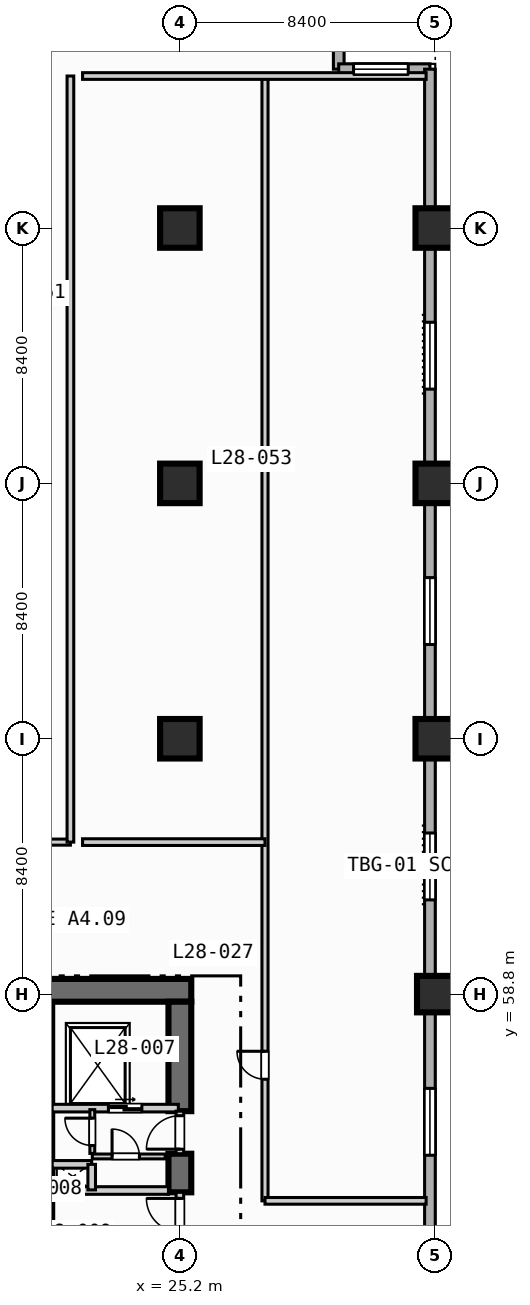
"""IFC4 building model, lengths in metres.
Left out: names, types, materials, properties, quantities, classifications, styles, units other than length and angle.
Written with IfcOpenShell. Run it as: python <this file> out.ifc"""

import sys

from ifc_helpers import new_model, si_unit, direction, frame, frame_2d, origin, origin_2d, place, context, subcontext, project, spatial, rectangle, extrude, element, fill, save


model = new_model("IFC4")
c1 = context("Model", 3, precision=1e-05, world=origin(), true_north=direction((0.0, 1.0)))
c2 = subcontext(c1, "Body", "Model", "MODEL_VIEW")
j1 = project(units=[si_unit("LENGTHUNIT", "METRE"), si_unit("PLANEANGLEUNIT", "RADIAN")], contexts=[c1])
p1 = place(None, origin())
s1 = spatial("IfcSite", under=j1, at=p1, CompositionType="ELEMENT")
p2 = place(p1, origin())
s2 = spatial("IfcBuilding", under=s1, at=p2, CompositionType="ELEMENT")
p3 = place(p2, frame((0.0, 0.0, 119.0)))
s3 = spatial("IfcBuildingStorey", under=s2, at=p3, CompositionType="ELEMENT", Elevation=119.0)
p4 = place(p3, frame((20.5, 58.925, 0.0), z_axis=(0.0, 0.0, 1.0), x_axis=(1.0, 0.0, 0.0)))
e1 = element("IfcWall", 1, at=p4, inside=s3, PredefinedType="SHEAR", context=c2, shape_type="SweptSolid", body=[
    extrude(rectangle(XDim=5.075, YDim=0.75, at=frame_2d((2.538, 0.0))), origin(), (0.0, 0.0, 1.0), 3.55),
])
p5 = place(p3, frame((25.2, 52.28, 0.0), z_axis=(0.0, 0.0, 1.0), x_axis=(0.0, 1.0, 0.0)))
e2 = element("IfcWall", 2, at=p5, inside=s3, PredefinedType="SHEAR", context=c2, shape_type="SweptSolid", body=[
    extrude(rectangle(XDim=1.27, YDim=0.75, at=frame_2d((0.635, 0.0))), origin(), (0.0, 0.0, 1.0), 3.55),
])
p6 = place(p3, frame((25.2, 54.95, 0.0), z_axis=(0.0, 0.0, 1.0), x_axis=(0.0, 1.0, 0.0)))
e3 = element("IfcWall", 3, at=p6, inside=s3, PredefinedType="SHEAR", context=c2, shape_type="SweptSolid", body=[
    extrude(rectangle(XDim=3.6, YDim=0.75, at=frame_2d((1.8, 0.0))), origin(), (0.0, 0.0, 1.0), 3.55),
])
for number, where, z_axis, x_axis in (
    (4, (25.2, 67.2, 0.0), (0.0, 0.0, 1.0), (1.0, 0.0, 0.0)),
    (5, (25.2, 75.6, 0.0), (0.0, 0.0, 1.0), (1.0, 0.0, 0.0)),
    (6, (25.2, 84.0, 0.0), (0.0, 0.0, 1.0), (1.0, 0.0, 0.0)),
):
    element("IfcColumn", number, at=place(p3, frame(where, z_axis=z_axis, x_axis=x_axis)), inside=s3, PredefinedType="COLUMN", context=c2, shape_type="SweptSolid", body=[
        extrude(rectangle(XDim=1.3, YDim=1.3, at=origin_2d()), origin(), (0.0, 0.0, 1.0), 3.8),
    ])
p7 = place(p3, frame((33.6, 58.8, 0.0), z_axis=(0.0, 0.0, 1.0), x_axis=(1.0, 0.0, 0.0)))
e7 = element("IfcColumn", 7, at=p7, inside=s3, PredefinedType="COLUMN", context=c2, shape_type="SweptSolid", body=[
    extrude(rectangle(XDim=1.2, YDim=1.2, at=origin_2d()), origin(), (0.0, 0.0, 1.0), 3.8),
])
for number, where, z_axis, x_axis in (
    (8, (33.6, 67.2, 0.0), (0.0, 0.0, 1.0), (1.0, 0.0, 0.0)),
    (9, (33.6, 75.6, 0.0), (0.0, 0.0, 1.0), (1.0, 0.0, 0.0)),
    (10, (33.6, 84.0, 0.0), (0.0, 0.0, 1.0), (1.0, 0.0, 0.0)),
):
    element("IfcColumn", number, at=place(p3, frame(where, z_axis=z_axis, x_axis=x_axis)), inside=s3, PredefinedType="COLUMN", context=c2, shape_type="SweptSolid", body=[
        extrude(rectangle(XDim=1.3, YDim=1.3, at=origin_2d()), origin(), (0.0, 0.0, 1.0), 3.8),
    ])
p8 = place(p3, frame((30.425, 92.225, 0.0), z_axis=(0.0, 0.0, 1.0), x_axis=(0.0, -1.0, 0.0)))
e11 = element("IfcWall", 11, at=p8, inside=s3, PredefinedType="STANDARD", context=c2, shape_type="SweptSolid", body=[
    extrude(rectangle(XDim=3.0, YDim=0.35, at=frame_2d((1.5, 0.0))), origin(), (0.0, 0.0, 1.0), 3.55),
])
p9 = place(p3, frame((30.425, 89.225, 0.0), z_axis=(0.0, 0.0, 1.0), x_axis=(1.0, 0.0, 0.0)))
e12 = element("IfcWall", 12, at=p9, inside=s3, PredefinedType="STANDARD", context=c2, shape_type="SweptSolid", body=[
    extrude(rectangle(XDim=3.0, YDim=0.35, at=frame_2d((1.5, 0.0))), origin(), (0.0, 0.0, 1.0), 3.55),
])
p10 = place(p9, frame((0.488, 0.0, 0.85)))
e13 = element("IfcOpeningElement", 13, at=p10, cuts=e12, PredefinedType="OPENING", context=c2, shape_type="SweptSolid", body=[
    extrude(rectangle(XDim=1.8, YDim=1.8, at=frame_2d((0.9, 0.9))), frame((0.0, 0.185, 0.0), z_axis=(0.0, -1.0, 0.0), x_axis=(1.0, 0.0, 0.0)), (0.0, 0.0, 1.0), 0.37),
])
p11 = place(p3, frame((33.425, 89.225, 0.0), z_axis=(0.0, 0.0, 1.0), x_axis=(0.0, -1.0, 0.0)))
e14 = element("IfcWall", 14, at=p11, inside=s3, PredefinedType="STANDARD", context=c2, shape_type="SweptSolid", body=[
    extrude(rectangle(XDim=55.8, YDim=0.35, at=frame_2d((27.9, 0.0))), origin(), (0.0, 0.0, 1.0), 3.55),
])
p12 = place(p11, frame((50.325, 0.0, 0.85)))
e15 = element("IfcOpeningElement", 15, at=p12, cuts=e14, PredefinedType="OPENING", context=c2, shape_type="SweptSolid", body=[
    extrude(rectangle(XDim=2.2, YDim=1.8, at=frame_2d((1.1, 0.9))), frame((0.0, 0.185, 0.0), z_axis=(0.0, -1.0, 0.0), x_axis=(1.0, 0.0, 0.0)), (0.0, 0.0, 1.0), 0.37),
])
p13 = place(p11, frame((33.525, 0.0, 0.85)))
e16 = element("IfcOpeningElement", 16, at=p13, cuts=e14, PredefinedType="OPENING", context=c2, shape_type="SweptSolid", body=[
    extrude(rectangle(XDim=2.2, YDim=1.8, at=frame_2d((1.1, 0.9))), frame((0.0, 0.185, 0.0), z_axis=(0.0, -1.0, 0.0), x_axis=(1.0, 0.0, 0.0)), (0.0, 0.0, 1.0), 0.37),
])
p14 = place(p11, frame((25.125, 0.0, 0.85)))
e17 = element("IfcOpeningElement", 17, at=p14, cuts=e14, PredefinedType="OPENING", context=c2, shape_type="SweptSolid", body=[
    extrude(rectangle(XDim=2.2, YDim=1.8, at=frame_2d((1.1, 0.9))), frame((0.0, 0.185, 0.0), z_axis=(0.0, -1.0, 0.0), x_axis=(1.0, 0.0, 0.0)), (0.0, 0.0, 1.0), 0.37),
])
p15 = place(p11, frame((16.725, 0.0, 0.85)))
e18 = element("IfcOpeningElement", 18, at=p15, cuts=e14, PredefinedType="OPENING", context=c2, shape_type="SweptSolid", body=[
    extrude(rectangle(XDim=2.2, YDim=1.8, at=frame_2d((1.1, 0.9))), frame((0.0, 0.185, 0.0), z_axis=(0.0, -1.0, 0.0), x_axis=(1.0, 0.0, 0.0)), (0.0, 0.0, 1.0), 0.37),
])
p16 = place(p11, frame((8.325, 0.0, 0.85)))
e19 = element("IfcOpeningElement", 19, at=p16, cuts=e14, PredefinedType="OPENING", context=c2, shape_type="SweptSolid", body=[
    extrude(rectangle(XDim=2.2, YDim=1.8, at=frame_2d((1.1, 0.9))), frame((0.0, 0.185, 0.0), z_axis=(0.0, -1.0, 0.0), x_axis=(1.0, 0.0, 0.0)), (0.0, 0.0, 1.0), 0.37),
])
p17 = place(p3, frame((25.2, 50.8, 0.0), z_axis=(0.0, 0.0, 1.0), x_axis=(0.0, 1.0, 0.0)))
e20 = element("IfcWall", 20, at=p17, inside=s3, PredefinedType="SOLIDWALL", context=c2, shape_type="SweptSolid", body=[
    extrude(rectangle(XDim=1.48, YDim=0.25, at=frame_2d((0.74, 0.0))), origin(), (0.0, 0.0, 1.0), 3.55),
])
p18 = place(p17, frame((0.18, 0.0, 0.0)))
e21 = element("IfcOpeningElement", 21, at=p18, cuts=e20, PredefinedType="OPENING", context=c2, shape_type="SweptSolid", body=[
    extrude(rectangle(XDim=1.1, YDim=2.15, at=frame_2d((0.55, 1.075))), frame((0.0, 0.135, 0.0), z_axis=(0.0, -1.0, 0.0), x_axis=(1.0, 0.0, 0.0)), (0.0, 0.0, 1.0), 0.27),
])
p19 = place(p3, frame((21.0, 52.34, 0.0), z_axis=(0.0, 0.0, 1.0), x_axis=(1.0, 0.0, 0.0)))
e22 = element("IfcWall", 22, at=p19, inside=s3, PredefinedType="SOLIDWALL", context=c2, shape_type="SweptSolid", body=[
    extrude(rectangle(XDim=3.825, YDim=0.25, at=frame_2d((1.913, 0.0))), origin(), (0.0, 0.0, 1.0), 3.55),
])
p20 = place(p3, frame((21.0, 55.05, 0.0), z_axis=(0.0, 0.0, 1.0), x_axis=(1.0, 0.0, 0.0)))
e23 = element("IfcWall", 23, at=p20, inside=s3, PredefinedType="SOLIDWALL", context=c2, shape_type="SweptSolid", body=[
    extrude(rectangle(XDim=4.15, YDim=0.25, at=frame_2d((2.075, 0.0))), origin(), (0.0, 0.0, 1.0), 3.55),
])
p21 = place(p20, frame((1.85, 0.0, 0.0)))
e24 = element("IfcOpeningElement", 24, at=p21, cuts=e23, PredefinedType="OPENING", context=c2, shape_type="SweptSolid", body=[
    extrude(rectangle(XDim=1.1, YDim=2.15, at=frame_2d((0.55, 1.075))), frame((0.0, 0.135, 0.0), z_axis=(0.0, -1.0, 0.0), x_axis=(1.0, 0.0, 0.0)), (0.0, 0.0, 1.0), 0.27),
])
p22 = place(p3, frame((25.2, 53.55, 0.0), z_axis=(0.0, 0.0, 1.0), x_axis=(0.0, 1.0, 0.0)))
e25 = element("IfcWall", 25, at=p22, inside=s3, PredefinedType="SOLIDWALL", context=c2, shape_type="SweptSolid", body=[
    extrude(rectangle(XDim=1.4, YDim=0.25, at=frame_2d((0.7, 0.0))), origin(), (0.0, 0.0, 1.0), 3.55),
])
p23 = place(p22, frame((0.15, 0.0, 0.0)))
e26 = element("IfcOpeningElement", 26, at=p23, cuts=e25, PredefinedType="OPENING", context=c2, shape_type="SweptSolid", body=[
    extrude(rectangle(XDim=1.1, YDim=2.15, at=frame_2d((0.55, 1.075))), frame((0.0, 0.135, 0.0), z_axis=(0.0, -1.0, 0.0), x_axis=(1.0, 0.0, 0.0)), (0.0, 0.0, 1.0), 0.27),
])
p24 = place(p3, frame((21.0, 53.2, 0.0), z_axis=(0.0, 0.0, 1.0), x_axis=(1.0, 0.0, 0.0)))
e27 = element("IfcWall", 27, at=p24, inside=s3, PredefinedType="SOLIDWALL", context=c2, shape_type="SweptSolid", body=[
    extrude(rectangle(XDim=1.3, YDim=0.25, at=frame_2d((0.65, 0.0))), origin(), (0.0, 0.0, 1.0), 3.55),
])
p25 = place(p3, frame((22.3, 52.36, 0.0), z_axis=(0.0, 0.0, 1.0), x_axis=(0.0, 1.0, 0.0)))
e28 = element("IfcWall", 28, at=p25, inside=s3, PredefinedType="SOLIDWALL", context=c2, shape_type="SweptSolid", body=[
    extrude(rectangle(XDim=0.84, YDim=0.25, at=frame_2d((0.42, 0.0))), origin(), (0.0, 0.0, 1.0), 3.55),
])
p26 = place(p3, frame((22.32, 53.56, 0.0), z_axis=(0.0, 0.0, 1.0), x_axis=(0.0, 1.0, 0.0)))
e29 = element("IfcWall", 29, at=p26, inside=s3, PredefinedType="PARTITIONING", context=c2, shape_type="SweptSolid", body=[
    extrude(rectangle(XDim=1.44, YDim=0.16, at=frame_2d((0.72, 0.0))), origin(), (0.0, 0.0, 1.0), 3.55),
])
p27 = place(p26, frame((0.26, 0.0, 0.0)))
e30 = element("IfcOpeningElement", 30, at=p27, cuts=e29, PredefinedType="OPENING", context=c2, shape_type="SweptSolid", body=[
    extrude(rectangle(XDim=0.9, YDim=2.1, at=frame_2d((0.45, 1.05))), frame((0.0, 0.09, 0.0), z_axis=(0.0, -1.0, 0.0), x_axis=(1.0, 0.0, 0.0)), (0.0, 0.0, 1.0), 0.18),
])
p28 = place(p3, frame((22.32, 53.46, 0.0), z_axis=(0.0, 0.0, 1.0), x_axis=(1.0, 0.0, 0.0)))
e31 = element("IfcWall", 31, at=p28, inside=s3, PredefinedType="PARTITIONING", context=c2, shape_type="SweptSolid", body=[
    extrude(rectangle(XDim=2.4, YDim=0.16, at=frame_2d((1.2, 0.0))), origin(), (0.0, 0.0, 1.0), 3.55),
])
p29 = place(p28, frame((0.65, 0.0, 0.0)))
e32 = element("IfcOpeningElement", 32, at=p29, cuts=e31, PredefinedType="OPENING", context=c2, shape_type="SweptSolid", body=[
    extrude(rectangle(XDim=0.9, YDim=2.1, at=frame_2d((0.45, 1.05))), frame((0.0, 0.09, 0.0), z_axis=(0.0, -1.0, 0.0), x_axis=(1.0, 0.0, 0.0)), (0.0, 0.0, 1.0), 0.18),
])
p30 = place(p3, frame((3.4, 63.8, 0.0), z_axis=(0.0, 0.0, 1.0), x_axis=(1.0, 0.0, 0.0)))
e33 = element("IfcWall", 33, at=p30, inside=s3, PredefinedType="PARTITIONING", context=c2, shape_type="SweptSolid", body=[
    extrude(rectangle(XDim=18.2, YDim=0.2, at=frame_2d((9.1, 0.0))), origin(), (0.0, 0.0, 1.0), 3.55),
])
p31 = place(p30, frame((4.05, 0.0, 0.0)))
e34 = element("IfcOpeningElement", 34, at=p31, cuts=e33, PredefinedType="OPENING", context=c2, shape_type="SweptSolid", body=[
    extrude(rectangle(XDim=1.0, YDim=2.15, at=frame_2d((0.5, 1.075))), frame((0.0, 0.11, 0.0), z_axis=(0.0, -1.0, 0.0), x_axis=(1.0, 0.0, 0.0)), (0.0, 0.0, 1.0), 0.22),
])
p32 = place(p3, frame((21.6, 63.8, 0.0), z_axis=(0.0, 0.0, 1.0), x_axis=(0.0, 1.0, 0.0)))
e35 = element("IfcWall", 35, at=p32, inside=s3, PredefinedType="PARTITIONING", context=c2, shape_type="SweptSolid", body=[
    extrude(rectangle(XDim=25.2, YDim=0.22, at=frame_2d((12.6, 0.0))), origin(), (0.0, 0.0, 1.0), 3.55),
])
p33 = place(p3, frame((28.0, 52.0, 0.0), z_axis=(0.0, 0.0, 1.0), x_axis=(0.0, 1.0, 0.0)))
e36 = element("IfcWall", 36, at=p33, inside=s3, PredefinedType="PARTITIONING", context=c2, shape_type="SweptSolid", body=[
    extrude(rectangle(XDim=37.0, YDim=0.2, at=frame_2d((18.5, 0.0))), origin(), (0.0, 0.0, 1.0), 3.55),
])
p34 = place(p33, frame((4.0, 0.0, 0.0)))
e37 = element("IfcOpeningElement", 37, at=p34, cuts=e36, PredefinedType="OPENING", context=c2, shape_type="SweptSolid", body=[
    extrude(rectangle(XDim=0.92, YDim=2.1, at=frame_2d((0.46, 1.05))), frame((0.0, 0.11, 0.0), z_axis=(0.0, -1.0, 0.0), x_axis=(1.0, 0.0, 0.0)), (0.0, 0.0, 1.0), 0.22),
])
p35 = place(p3, frame((28.0, 52.0, 0.0), z_axis=(0.0, 0.0, 1.0), x_axis=(1.0, 0.0, 0.0)))
e38 = element("IfcWall", 38, at=p35, inside=s3, PredefinedType="PARTITIONING", context=c2, shape_type="SweptSolid", body=[
    extrude(rectangle(XDim=5.3, YDim=0.22, at=frame_2d((2.65, 0.0))), origin(), (0.0, 0.0, 1.0), 3.55),
])
p36 = place(p3, frame((22.0, 89.0, 0.0), z_axis=(0.0, 0.0, 1.0), x_axis=(1.0, 0.0, 0.0)))
e39 = element("IfcWall", 39, at=p36, inside=s3, PredefinedType="PARTITIONING", context=c2, shape_type="SweptSolid", body=[
    extrude(rectangle(XDim=11.3, YDim=0.22, at=frame_2d((5.65, 0.0))), origin(), (0.0, 0.0, 1.0), 3.55),
])
p37 = place(p3, frame((22.0, 63.8, 0.0), z_axis=(0.0, 0.0, 1.0), x_axis=(1.0, 0.0, 0.0)))
e40 = element("IfcWall", 40, at=p37, inside=s3, PredefinedType="PARTITIONING", context=c2, shape_type="SweptSolid", body=[
    extrude(rectangle(XDim=6.0, YDim=0.22, at=frame_2d((3.0, 0.0))), origin(), (0.0, 0.0, 1.0), 3.55),
])
p38 = place(p10, origin())
e41 = element("IfcWindow", 41, at=p38, inside=s3, PartitioningType="SINGLE_PANEL", PredefinedType="WINDOW", context=c2, shape_type="SweptSolid", body=[
    extrude(rectangle(XDim=1.8, YDim=1.8, at=frame_2d((0.9, 0.9))), frame((0.0, 0.03, 0.0), z_axis=(0.0, -1.0, 0.0), x_axis=(1.0, 0.0, 0.0)), (0.0, 0.0, 1.0), 0.06),
])
fill(e13, e41)
p39 = place(p13, origin())
e42 = element("IfcWindow", 42, at=p39, inside=s3, PartitioningType="SINGLE_PANEL", PredefinedType="WINDOW", context=c2, shape_type="SweptSolid", body=[
    extrude(rectangle(XDim=2.2, YDim=1.8, at=frame_2d((1.1, 0.9))), frame((0.0, 0.03, 0.0), z_axis=(0.0, -1.0, 0.0), x_axis=(1.0, 0.0, 0.0)), (0.0, 0.0, 1.0), 0.06),
])
fill(e16, e42)
p40 = place(p14, origin())
e43 = element("IfcWindow", 43, at=p40, inside=s3, PartitioningType="SINGLE_PANEL", PredefinedType="WINDOW", context=c2, shape_type="SweptSolid", body=[
    extrude(rectangle(XDim=2.2, YDim=1.8, at=frame_2d((1.1, 0.9))), frame((0.0, 0.03, 0.0), z_axis=(0.0, -1.0, 0.0), x_axis=(1.0, 0.0, 0.0)), (0.0, 0.0, 1.0), 0.06),
])
fill(e17, e43)
p41 = place(p15, origin())
e44 = element("IfcWindow", 44, at=p41, inside=s3, PartitioningType="SINGLE_PANEL", PredefinedType="WINDOW", context=c2, shape_type="SweptSolid", body=[
    extrude(rectangle(XDim=2.2, YDim=1.8, at=frame_2d((1.1, 0.9))), frame((0.0, 0.03, 0.0), z_axis=(0.0, -1.0, 0.0), x_axis=(1.0, 0.0, 0.0)), (0.0, 0.0, 1.0), 0.06),
])
fill(e18, e44)
p42 = place(p16, origin())
e45 = element("IfcWindow", 45, at=p42, inside=s3, PartitioningType="SINGLE_PANEL", PredefinedType="WINDOW", context=c2, shape_type="SweptSolid", body=[
    extrude(rectangle(XDim=2.2, YDim=1.8, at=frame_2d((1.1, 0.9))), frame((0.0, 0.03, 0.0), z_axis=(0.0, -1.0, 0.0), x_axis=(1.0, 0.0, 0.0)), (0.0, 0.0, 1.0), 0.06),
])
fill(e19, e45)
p43 = place(p18, origin())
e46 = element("IfcDoor", 46, at=p43, inside=s3, OperationType="SINGLE_SWING_RIGHT", PredefinedType="DOOR", context=c2, shape_type="SweptSolid", body=[
    extrude(rectangle(XDim=1.1, YDim=2.15, at=frame_2d((0.55, 1.075))), frame((0.0, 0.025, 0.0), z_axis=(0.0, -1.0, 0.0), x_axis=(1.0, 0.0, 0.0)), (0.0, 0.0, 1.0), 0.05),
])
fill(e21, e46)
p44 = place(p21, origin())
e47 = element("IfcDoor", 47, at=p44, inside=s3, OperationType="SLIDING_TO_LEFT", PredefinedType="DOOR", context=c2, shape_type="SweptSolid", body=[
    extrude(rectangle(XDim=1.1, YDim=2.15, at=frame_2d((0.55, 1.075))), frame((0.0, 0.025, 0.0), z_axis=(0.0, -1.0, 0.0), x_axis=(1.0, 0.0, 0.0)), (0.0, 0.0, 1.0), 0.05),
])
fill(e24, e47)
p45 = place(p23, origin())
e48 = element("IfcDoor", 48, at=p45, inside=s3, OperationType="SINGLE_SWING_LEFT", PredefinedType="DOOR", context=c2, shape_type="SweptSolid", body=[
    extrude(rectangle(XDim=1.1, YDim=2.15, at=frame_2d((0.55, 1.075))), frame((0.0, 0.025, 0.0), z_axis=(0.0, -1.0, 0.0), x_axis=(1.0, 0.0, 0.0)), (0.0, 0.0, 1.0), 0.05),
])
fill(e26, e48)
p46 = place(p27, origin())
e49 = element("IfcDoor", 49, at=p46, inside=s3, OperationType="SINGLE_SWING_RIGHT", PredefinedType="DOOR", context=c2, shape_type="SweptSolid", body=[
    extrude(rectangle(XDim=0.9, YDim=2.1, at=frame_2d((0.45, 1.05))), frame((0.0, 0.025, 0.0), z_axis=(0.0, -1.0, 0.0), x_axis=(1.0, 0.0, 0.0)), (0.0, 0.0, 1.0), 0.05),
])
fill(e30, e49)
p47 = place(p29, origin())
e50 = element("IfcDoor", 50, at=p47, inside=s3, OperationType="SINGLE_SWING_LEFT", PredefinedType="DOOR", context=c2, shape_type="SweptSolid", body=[
    extrude(rectangle(XDim=0.9, YDim=2.1, at=frame_2d((0.45, 1.05))), frame((0.0, 0.025, 0.0), z_axis=(0.0, -1.0, 0.0), x_axis=(1.0, 0.0, 0.0)), (0.0, 0.0, 1.0), 0.05),
])
fill(e32, e50)
p48 = place(p34, origin())
e51 = element("IfcDoor", 51, at=p48, inside=s3, OperationType="SINGLE_SWING_RIGHT", PredefinedType="DOOR", context=c2, shape_type="SweptSolid", body=[
    extrude(rectangle(XDim=0.92, YDim=2.1, at=frame_2d((0.46, 1.05))), frame((0.0, 0.025, 0.0), z_axis=(0.0, -1.0, 0.0), x_axis=(1.0, 0.0, 0.0)), (0.0, 0.0, 1.0), 0.05),
])
fill(e37, e51)
save(model, sys.argv[1])
